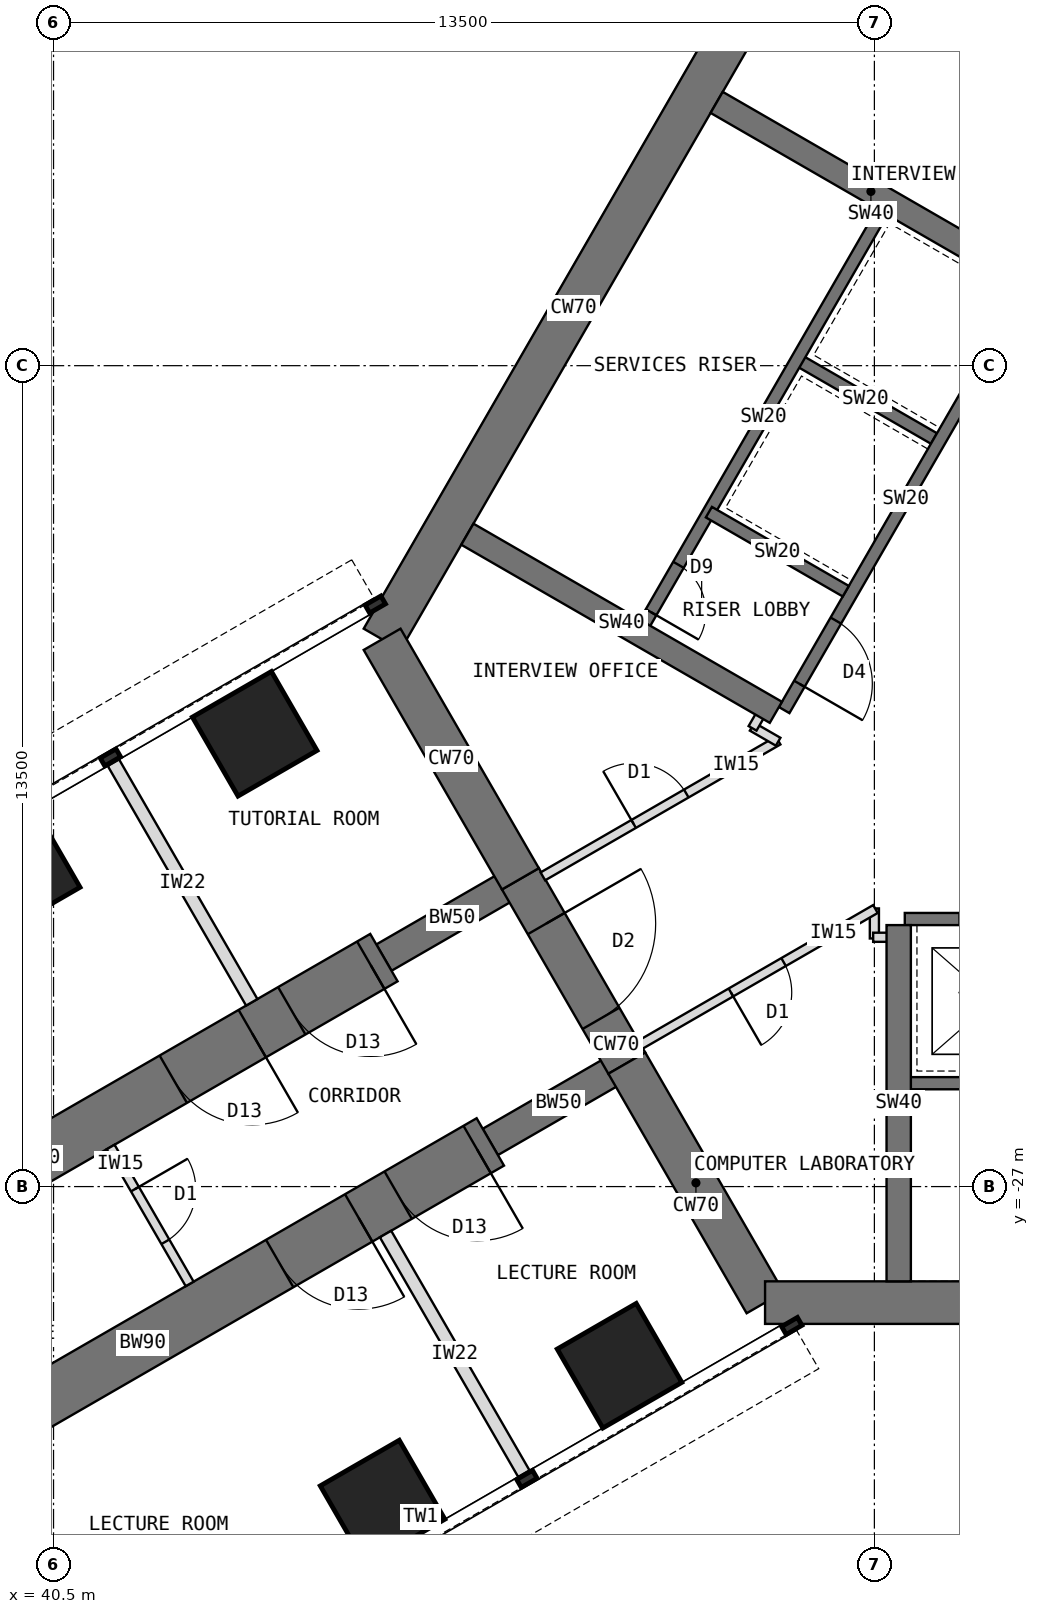
"""IFC4 building model, lengths in metres.
Left out: names, types, materials, properties, quantities, classifications, styles, units other than length and angle.
Written with IfcOpenShell. Run it as: python <this file> out.ifc"""

import sys

from ifc_helpers import new_model, si_unit, direction, frame, frame_2d, origin, origin_2d, place, context, subcontext, project, spatial, rectangle, extrude, element, fill, save


model = new_model("IFC4")
c1 = context("Model", 3, precision=1e-05, world=origin(), true_north=direction((0.0, 1.0)))
c2 = subcontext(c1, "Body", "Model", "MODEL_VIEW")
j1 = project(units=[si_unit("LENGTHUNIT", "METRE"), si_unit("PLANEANGLEUNIT", "RADIAN")], contexts=[c1])
p1 = place(None, origin())
s1 = spatial("IfcSite", under=j1, at=p1, CompositionType="ELEMENT")
p2 = place(p1, origin())
s2 = spatial("IfcBuilding", under=s1, at=p2, CompositionType="ELEMENT")
p3 = place(p2, frame((0.0, 0.0, 28.5)))
s3 = spatial("IfcBuildingStorey", under=s2, at=p3, CompositionType="ELEMENT", Elevation=28.5)
p4 = place(p3, frame((52.202, -7.092, 0.0), z_axis=(0.0, 0.0, 1.0), x_axis=(-0.500005998175, -0.866021940709, 0.0)))
e1 = element("IfcWall", 1, at=p4, inside=s3, PredefinedType="SHEAR", context=c2, shape_type="SweptSolid", body=[
    extrude(rectangle(XDim=12.596, YDim=0.7, at=frame_2d((6.298, 0.0))), origin(), (0.0, 0.0, 1.0), 4.0),
])
p5 = place(p3, frame((45.904, -18.0, 0.0), z_axis=(0.0, 0.0, 1.0), x_axis=(0.500024481964, -0.866011268655, 0.0)))
e2 = element("IfcWall", 2, at=p5, inside=s3, PredefinedType="SHEAR", context=c2, shape_type="SweptSolid", body=[
    extrude(rectangle(XDim=4.548, YDim=0.7, at=frame_2d((2.274, 0.0))), origin(), (0.0, 0.0, 1.0), 4.0),
])
p6 = place(p3, frame((48.178, -21.939, 0.0), z_axis=(0.0, 0.0, 1.0), x_axis=(0.500010275428, -0.866019471182, 0.0)))
e3 = element("IfcWall", 3, at=p6, inside=s3, PredefinedType="SHEAR", context=c2, shape_type="SweptSolid", body=[
    extrude(rectangle(XDim=3.5, YDim=0.7, at=frame_2d((1.75, 0.0))), origin(), (0.0, 0.0, 1.0), 4.0),
])
p7 = place(p6, frame((0.85, 0.0, 0.0)))
e4 = element("IfcOpeningElement", 4, at=p7, cuts=e3, PredefinedType="OPENING", context=c2, shape_type="SweptSolid", body=[
    extrude(rectangle(XDim=1.8, YDim=2.1, at=frame_2d((0.9, 1.05))), frame((0.0, 0.36, 0.0), z_axis=(0.0, -1.0, 0.0), x_axis=(1.0, 0.0, 0.0)), (0.0, 0.0, 1.0), 0.72),
])
p8 = place(p3, frame((49.928, -24.97, 0.0), z_axis=(0.0, 0.0, 1.0), x_axis=(0.499984222037, -0.866034513004, 0.0)))
e5 = element("IfcWall", 5, at=p8, inside=s3, PredefinedType="SHEAR", context=c2, shape_type="SweptSolid", body=[
    extrude(rectangle(XDim=4.548, YDim=0.7, at=frame_2d((2.274, 0.0))), origin(), (0.0, 0.0, 1.0), 4.0),
])
p9 = place(p3, frame((52.202, -28.908, 0.0), z_axis=(0.0, 0.0, 1.0), x_axis=(1.0, 0.0, 0.0)))
e6 = element("IfcWall", 6, at=p9, inside=s3, PredefinedType="SHEAR", context=c2, shape_type="SweptSolid", body=[
    extrude(rectangle(XDim=12.596, YDim=0.7, at=frame_2d((6.298, 0.0))), origin(), (0.0, 0.0, 1.0), 4.0),
])
p10 = place(p3, frame((49.928, -24.97, 0.0), z_axis=(0.0, 0.0, 1.0), x_axis=(-0.866031863473, -0.499988811324, 0.0)))
e7 = element("IfcWall", 7, at=p10, inside=s3, PredefinedType="SHEAR", context=c2, shape_type="SweptSolid", body=[
    extrude(rectangle(XDim=2.592, YDim=0.5, at=frame_2d((1.296, 0.0))), origin(), (0.0, 0.0, 1.0), 4.0),
])
p11 = place(p3, frame((47.684, -26.266, 0.0), z_axis=(0.0, 0.0, 1.0), x_axis=(-0.866027579429, -0.499996231654, 0.0)))
e8 = element("IfcWall", 8, at=p11, inside=s3, PredefinedType="SHEAR", context=c2, shape_type="SweptSolid", body=[
    extrude(rectangle(XDim=13.2, YDim=0.9, at=frame_2d((6.6, 0.0))), origin(), (0.0, 0.0, 1.0), 4.0),
])
p12 = place(p11, frame((0.25, 0.0, 0.0)))
e9 = element("IfcOpeningElement", 9, at=p12, cuts=e8, PredefinedType="OPENING", context=c2, shape_type="SweptSolid", body=[
    extrude(rectangle(XDim=1.5, YDim=2.1, at=frame_2d((0.75, 1.05))), frame((0.0, 0.46, 0.0), z_axis=(0.0, -1.0, 0.0), x_axis=(1.0, 0.0, 0.0)), (0.0, 0.0, 1.0), 0.92),
])
p13 = place(p11, frame((2.5, 0.0, 0.0)))
e10 = element("IfcOpeningElement", 10, at=p13, cuts=e8, PredefinedType="OPENING", context=c2, shape_type="SweptSolid", body=[
    extrude(rectangle(XDim=1.5, YDim=2.1, at=frame_2d((0.75, 1.05))), frame((0.0, 0.46, 0.0), z_axis=(0.0, -1.0, 0.0), x_axis=(1.0, 0.0, 0.0)), (0.0, 0.0, 1.0), 0.92),
])
p14 = place(p3, frame((48.178, -21.939, 0.0), z_axis=(0.0, 0.0, 1.0), x_axis=(-0.866072649678, -0.499918158782, 0.0)))
e11 = element("IfcWall", 11, at=p14, inside=s3, PredefinedType="SHEAR", context=c2, shape_type="SweptSolid", body=[
    extrude(rectangle(XDim=2.592, YDim=0.5, at=frame_2d((1.296, 0.0))), origin(), (0.0, 0.0, 1.0), 4.0),
])
p15 = place(p3, frame((45.934, -23.234, 0.0), z_axis=(0.0, 0.0, 1.0), x_axis=(-0.866019570528, -0.500010103361, 0.0)))
e12 = element("IfcWall", 12, at=p15, inside=s3, PredefinedType="SHEAR", context=c2, shape_type="SweptSolid", body=[
    extrude(rectangle(XDim=13.2, YDim=0.9, at=frame_2d((6.6, 0.0))), origin(), (0.0, 0.0, 1.0), 4.0),
])
p16 = place(p15, frame((0.25, 0.0, 0.0)))
e13 = element("IfcOpeningElement", 13, at=p16, cuts=e12, PredefinedType="OPENING", context=c2, shape_type="SweptSolid", body=[
    extrude(rectangle(XDim=1.5, YDim=2.1, at=frame_2d((0.75, 1.05))), frame((0.0, 0.46, 0.0), z_axis=(0.0, -1.0, 0.0), x_axis=(1.0, 0.0, 0.0)), (0.0, 0.0, 1.0), 0.92),
])
p17 = place(p15, frame((2.5, 0.0, 0.0)))
e14 = element("IfcOpeningElement", 14, at=p17, cuts=e12, PredefinedType="OPENING", context=c2, shape_type="SweptSolid", body=[
    extrude(rectangle(XDim=1.5, YDim=2.1, at=frame_2d((0.75, 1.05))), frame((0.0, 0.46, 0.0), z_axis=(0.0, -1.0, 0.0), x_axis=(1.0, 0.0, 0.0)), (0.0, 0.0, 1.0), 0.92),
])
for number, where, z_axis, x_axis in (
    (15, (49.809, -29.946, 0.0), (0.0, 0.0, 1.0), (0.866, 0.5, 0.0)),
    (16, (43.809, -19.554, 0.0), (0.0, 0.0, 1.0), (0.866, 0.5, 0.0)),
    (17, (45.912, -32.196, 0.0), (0.0, 0.0, 1.0), (0.866, 0.5, 0.0)),
    (18, (39.912, -21.804, 0.0), (0.0, 0.0, 1.0), (0.866, 0.5, 0.0)),
):
    element("IfcColumn", number, at=place(p3, frame(where, z_axis=z_axis, x_axis=x_axis)), inside=s3, PredefinedType="COLUMN", context=c2, shape_type="SweptSolid", body=[
        extrude(rectangle(XDim=1.5, YDim=1.5, at=origin_2d()), origin(), (0.0, 0.0, 1.0), 4.0),
    ])
p18 = place(p3, frame((56.516, -12.236, 0.0), z_axis=(0.0, 0.0, 1.0), x_axis=(-0.49999894854, -0.866026010844, 0.0)))
e19 = element("IfcWall", 19, at=p18, inside=s3, PredefinedType="SHEAR", context=c2, shape_type="SweptSolid", body=[
    extrude(rectangle(XDim=8.0, YDim=0.2, at=frame_2d((4.0, 0.0))), origin(), (0.0, 0.0, 1.0), 4.0),
])
p19 = place(p18, frame((6.3, 0.0, 0.0)))
e20 = element("IfcOpeningElement", 20, at=p19, cuts=e19, PredefinedType="OPENING", context=c2, shape_type="SweptSolid", body=[
    extrude(rectangle(XDim=1.2, YDim=2.1, at=frame_2d((0.6, 1.05))), frame((0.0, 0.11, 0.0), z_axis=(0.0, -1.0, 0.0), x_axis=(1.0, 0.0, 0.0)), (0.0, 0.0, 1.0), 0.22),
])
for number, where, z_axis, x_axis in (
    (21, (54.98, -14.697, 0.0), (0.0, 0.0, 1.0), (-0.866, 0.5, 0.0)),
    (22, (53.53, -17.209, 0.0), (0.0, 0.0, 1.0), (-0.866, 0.5, 0.0)),
):
    element("IfcWall", number, at=place(p3, frame(where, z_axis=z_axis, x_axis=x_axis)), inside=s3, PredefinedType="SHEAR", context=c2, shape_type="SweptSolid", body=[
        extrude(rectangle(XDim=2.6, YDim=0.2, at=frame_2d((1.3, 0.0))), origin(), (0.0, 0.0, 1.0), 4.0),
    ])
p20 = place(p3, frame((54.178, -10.886, 0.0), z_axis=(0.0, 0.0, 1.0), x_axis=(-0.49999894854, -0.866026010844, 0.0)))
e23 = element("IfcWall", 23, at=p20, inside=s3, PredefinedType="SHEAR", context=c2, shape_type="SweptSolid", body=[
    extrude(rectangle(XDim=8.0, YDim=0.2, at=frame_2d((4.0, 0.0))), origin(), (0.0, 0.0, 1.0), 4.0),
])
p21 = place(p20, frame((6.8, 0.0, 0.0)))
e24 = element("IfcOpeningElement", 24, at=p21, cuts=e23, PredefinedType="OPENING", context=c2, shape_type="SweptSolid", body=[
    extrude(rectangle(XDim=0.9, YDim=2.1, at=frame_2d((0.45, 1.05))), frame((0.0, 0.11, 0.0), z_axis=(0.0, -1.0, 0.0), x_axis=(1.0, 0.0, 0.0)), (0.0, 0.0, 1.0), 0.22),
])
for number, where, z_axis, x_axis in (
    (25, (52.38, -19.201, 0.0), (0.0, 0.0, 1.0), (-0.866, 0.5, 0.0)),
    (26, (56.48, -12.099, 0.0), (0.0, 0.0, 1.0), (-0.866, 0.5, 0.0)),
):
    element("IfcWall", number, at=place(p3, frame(where, z_axis=z_axis, x_axis=x_axis)), inside=s3, PredefinedType="SHEAR", context=c2, shape_type="SweptSolid", body=[
        extrude(rectangle(XDim=5.858, YDim=0.4, at=frame_2d((2.929, 0.0))), origin(), (0.0, 0.0, 1.0), 4.0),
    ])
p22 = place(p3, frame((54.5, -22.6, 0.0), z_axis=(0.0, 0.0, 1.0), x_axis=(1.0, 0.0, 0.0)))
e27 = element("IfcWall", 27, at=p22, inside=s3, PredefinedType="SHEAR", context=c2, shape_type="SweptSolid", body=[
    extrude(rectangle(XDim=8.0, YDim=0.2, at=frame_2d((4.0, 0.0))), origin(), (0.0, 0.0, 1.0), 4.0),
])
p23 = place(p22, frame((6.3, 0.0, 0.0)))
e28 = element("IfcOpeningElement", 28, at=p23, cuts=e27, PredefinedType="OPENING", context=c2, shape_type="SweptSolid", body=[
    extrude(rectangle(XDim=1.2, YDim=2.1, at=frame_2d((0.6, 1.05))), frame((0.0, 0.11, 0.0), z_axis=(0.0, -1.0, 0.0), x_axis=(1.0, 0.0, 0.0)), (0.0, 0.0, 1.0), 0.22),
])
p24 = place(p22, frame((0.9, 0.0, 0.0)))
e29 = element("IfcOpeningElement", 29, at=p24, cuts=e27, PredefinedType="OPENING", context=c2, shape_type="SweptSolid", body=[
    extrude(rectangle(XDim=1.1, YDim=2.2, at=frame_2d((0.55, 1.1))), frame((0.0, 0.11, 0.0), z_axis=(0.0, -1.0, 0.0), x_axis=(1.0, 0.0, 0.0)), (0.0, 0.0, 1.0), 0.22),
])
p25 = place(p3, frame((54.5, -25.3, 0.0), z_axis=(0.0, 0.0, 1.0), x_axis=(1.0, 0.0, 0.0)))
e30 = element("IfcWall", 30, at=p25, inside=s3, PredefinedType="SHEAR", context=c2, shape_type="SweptSolid", body=[
    extrude(rectangle(XDim=8.0, YDim=0.2, at=frame_2d((4.0, 0.0))), origin(), (0.0, 0.0, 1.0), 4.0),
])
p26 = place(p25, frame((6.7, 0.0, 0.0)))
e31 = element("IfcOpeningElement", 31, at=p26, cuts=e30, PredefinedType="OPENING", context=c2, shape_type="SweptSolid", body=[
    extrude(rectangle(XDim=1.1, YDim=2.1, at=frame_2d((0.55, 1.05))), frame((0.0, 0.11, 0.0), z_axis=(0.0, -1.0, 0.0), x_axis=(1.0, 0.0, 0.0)), (0.0, 0.0, 1.0), 0.22),
])
p27 = place(p3, frame((54.4, -22.7, 0.0), z_axis=(0.0, 0.0, 1.0), x_axis=(0.0, -1.0, 0.0)))
e32 = element("IfcWall", 32, at=p27, inside=s3, PredefinedType="SHEAR", context=c2, shape_type="SweptSolid", body=[
    extrude(rectangle(XDim=5.858, YDim=0.4, at=frame_2d((2.929, 0.0))), origin(), (0.0, 0.0, 1.0), 4.0),
])
for number, where, z_axis, x_axis in (
    (33, (45.96, -27.78, 0.0), (0.0, 0.0, 1.0), (0.5, -0.866, 0.0)),
    (34, (43.76, -23.97, 0.0), (0.0, 0.0, 1.0), (-0.5, 0.866, 0.0)),
):
    element("IfcWall", number, at=place(p3, frame(where, z_axis=z_axis, x_axis=x_axis)), inside=s3, PredefinedType="PARTITIONING", context=c2, shape_type="SweptSolid", body=[
        extrude(rectangle(XDim=4.55, YDim=0.215, at=frame_2d((2.275, 0.0))), origin(), (0.0, 0.0, 1.0), 3.8),
    ])
p28 = place(p3, frame((54.0, -22.92, 0.0), z_axis=(0.0, 0.0, 1.0), x_axis=(0.0, 1.0, 0.0)))
e35 = element("IfcWall", 35, at=p28, inside=s3, PredefinedType="PARTITIONING", context=c2, shape_type="SweptSolid", body=[
    extrude(rectangle(XDim=0.494, YDim=0.15, at=frame_2d((0.247, 0.0))), origin(), (0.0, 0.0, 1.0), 3.8),
])
p29 = place(p3, frame((54.017, -22.436, 0.0), z_axis=(0.0, 0.0, 1.0), x_axis=(-0.866015446554, -0.500017246033, 0.0)))
e36 = element("IfcWall", 36, at=p29, inside=s3, PredefinedType="PARTITIONING", context=c2, shape_type="SweptSolid", body=[
    extrude(rectangle(XDim=4.469, YDim=0.15, at=frame_2d((2.234, 0.0))), origin(), (0.0, 0.0, 1.0), 3.8),
])
p30 = place(p29, frame((1.744, 0.0, 0.0)))
e37 = element("IfcOpeningElement", 37, at=p30, cuts=e36, PredefinedType="OPENING", context=c2, shape_type="SweptSolid", body=[
    extrude(rectangle(XDim=1.0, YDim=2.1, at=frame_2d((0.5, 1.05))), frame((0.0, 0.085, 0.0), z_axis=(0.0, -1.0, 0.0), x_axis=(1.0, 0.0, 0.0)), (0.0, 0.0, 1.0), 0.17),
])
p31 = place(p3, frame((48.548, -21.898, 0.0), z_axis=(0.0, 0.0, 1.0), x_axis=(0.866025445582, 0.499999927604, 0.0)))
e38 = element("IfcWall", 38, at=p31, inside=s3, PredefinedType="PARTITIONING", context=c2, shape_type="SweptSolid", body=[
    extrude(rectangle(XDim=4.468, YDim=0.15, at=frame_2d((2.234, 0.0))), origin(), (0.0, 0.0, 1.0), 3.8),
])
p32 = place(p31, frame((1.724, 0.0, 0.0)))
e39 = element("IfcOpeningElement", 39, at=p32, cuts=e38, PredefinedType="OPENING", context=c2, shape_type="SweptSolid", body=[
    extrude(rectangle(XDim=1.0, YDim=2.1, at=frame_2d((0.5, 1.05))), frame((0.0, 0.085, 0.0), z_axis=(0.0, -1.0, 0.0), x_axis=(1.0, 0.0, 0.0)), (0.0, 0.0, 1.0), 0.17),
])
p33 = place(p3, frame((52.417, -19.684, 0.0), z_axis=(0.0, 0.0, 1.0), x_axis=(-0.865831790172, 0.50033519877, 0.0)))
e40 = element("IfcWall", 40, at=p33, inside=s3, PredefinedType="PARTITIONING", context=c2, shape_type="SweptSolid", body=[
    extrude(rectangle(XDim=0.494, YDim=0.15, at=frame_2d((0.247, 0.0))), origin(), (0.0, 0.0, 1.0), 3.8),
])
for number, where, z_axis, x_axis in (
    (41, (51.997, -19.464, 0.0), (0.0, 0.0, 1.0), (0.5, 0.866, 0.0)),
    (42, (54.41, -22.9, 0.0), (0.0, 0.0, 1.0), (-1.0, 0.0, 0.0)),
):
    element("IfcWall", number, at=place(p3, frame(where, z_axis=z_axis, x_axis=x_axis)), inside=s3, PredefinedType="PARTITIONING", context=c2, shape_type="SweptSolid", body=[
        extrude(rectangle(XDim=0.43, YDim=0.15, at=frame_2d((0.215, 0.0))), origin(), (0.0, 0.0, 1.0), 3.8),
    ])
p34 = place(p3, frame((41.439, -26.349, 0.0), z_axis=(0.0, 0.0, 1.0), x_axis=(0.500006934395, -0.866021400173, 0.0)))
e43 = element("IfcWall", 43, at=p34, inside=s3, PredefinedType="PARTITIONING", context=c2, shape_type="SweptSolid", body=[
    extrude(rectangle(XDim=2.6, YDim=0.15, at=frame_2d((1.3, 0.0))), origin(), (0.0, 0.0, 1.0), 3.8),
])
p35 = place(p34, frame((0.8, 0.0, 0.0)))
e44 = element("IfcOpeningElement", 44, at=p35, cuts=e43, PredefinedType="OPENING", context=c2, shape_type="SweptSolid", body=[
    extrude(rectangle(XDim=1.0, YDim=2.1, at=frame_2d((0.5, 1.05))), frame((0.0, 0.085, 0.0), z_axis=(0.0, -1.0, 0.0), x_axis=(1.0, 0.0, 0.0)), (0.0, 0.0, 1.0), 0.17),
])
p36 = place(p19, origin())
e45 = element("IfcDoor", 45, at=p36, inside=s3, OperationType="SINGLE_SWING_RIGHT", PredefinedType="DOOR", context=c2, shape_type="SweptSolid", body=[
    extrude(rectangle(XDim=1.2, YDim=2.1, at=frame_2d((0.6, 1.05))), frame((0.0, 0.025, 0.0), z_axis=(0.0, -1.0, 0.0), x_axis=(1.0, 0.0, 0.0)), (0.0, 0.0, 1.0), 0.05),
])
fill(e20, e45)
p37 = place(p21, origin())
e46 = element("IfcDoor", 46, at=p37, inside=s3, OperationType="SINGLE_SWING_RIGHT", PredefinedType="DOOR", context=c2, shape_type="SweptSolid", body=[
    extrude(rectangle(XDim=0.9, YDim=2.1, at=frame_2d((0.45, 1.05))), frame((0.0, 0.025, 0.0), z_axis=(0.0, -1.0, 0.0), x_axis=(1.0, 0.0, 0.0)), (0.0, 0.0, 1.0), 0.05),
])
fill(e24, e46)
p38 = place(p7, origin())
e47 = element("IfcDoor", 47, at=p38, inside=s3, OperationType="DOUBLE_DOOR_DOUBLE_SWING", PredefinedType="DOOR", context=c2, shape_type="SweptSolid", body=[
    extrude(rectangle(XDim=1.72, YDim=2.06, at=frame_2d((0.9, 1.03))), frame((0.0, 0.025, 0.0), z_axis=(0.0, -1.0, 0.0), x_axis=(1.0, 0.0, 0.0)), (0.0, 0.0, 1.0), 0.05),
    extrude(rectangle(XDim=0.04, YDim=2.1, at=frame_2d((0.02, 1.05))), frame((0.0, 0.35, 0.0), z_axis=(0.0, -1.0, 0.0), x_axis=(1.0, 0.0, 0.0)), (0.0, 0.0, 1.0), 0.699),
    extrude(rectangle(XDim=0.04, YDim=2.1, at=frame_2d((1.78, 1.05))), frame((0.0, 0.35, 0.0), z_axis=(0.0, -1.0, 0.0), x_axis=(1.0, 0.0, 0.0)), (0.0, 0.0, 1.0), 0.699),
    extrude(rectangle(XDim=1.72, YDim=0.04, at=frame_2d((0.9, 2.08))), frame((0.0, 0.35, 0.0), z_axis=(0.0, -1.0, 0.0), x_axis=(1.0, 0.0, 0.0)), (0.0, 0.0, 1.0), 0.699),
])
fill(e4, e47)
p39 = place(p32, origin())
e48 = element("IfcDoor", 48, at=p39, inside=s3, OperationType="SINGLE_SWING_LEFT", PredefinedType="DOOR", context=c2, shape_type="SweptSolid", body=[
    extrude(rectangle(XDim=1.0, YDim=2.1, at=frame_2d((0.5, 1.05))), frame((0.0, 0.025, 0.0), z_axis=(0.0, -1.0, 0.0), x_axis=(1.0, 0.0, 0.0)), (0.0, 0.0, 1.0), 0.05),
])
fill(e39, e48)
p40 = place(p30, origin())
e49 = element("IfcDoor", 49, at=p40, inside=s3, OperationType="SINGLE_SWING_RIGHT", PredefinedType="DOOR", context=c2, shape_type="SweptSolid", body=[
    extrude(rectangle(XDim=1.0, YDim=2.1, at=frame_2d((0.5, 1.05))), frame((0.0, 0.025, 0.0), z_axis=(0.0, -1.0, 0.0), x_axis=(1.0, 0.0, 0.0)), (0.0, 0.0, 1.0), 0.05),
])
fill(e37, e49)
p41 = place(p35, origin())
e50 = element("IfcDoor", 50, at=p41, inside=s3, OperationType="SINGLE_SWING_LEFT", PredefinedType="DOOR", context=c2, shape_type="SweptSolid", body=[
    extrude(rectangle(XDim=1.0, YDim=2.1, at=frame_2d((0.5, 1.05))), frame((0.0, 0.025, 0.0), z_axis=(0.0, -1.0, 0.0), x_axis=(1.0, 0.0, 0.0)), (0.0, 0.0, 1.0), 0.05),
])
fill(e44, e50)
p42 = place(p12, origin())
e51 = element("IfcDoor", 51, at=p42, inside=s3, OperationType="DOUBLE_DOOR_SINGLE_SWING", PredefinedType="DOOR", context=c2, shape_type="SweptSolid", body=[
    extrude(rectangle(XDim=1.42, YDim=2.06, at=frame_2d((0.75, 1.03))), frame((0.0, 0.025, 0.0), z_axis=(0.0, -1.0, 0.0), x_axis=(1.0, 0.0, 0.0)), (0.0, 0.0, 1.0), 0.05),
    extrude(rectangle(XDim=0.04, YDim=2.1, at=frame_2d((0.02, 1.05))), frame((0.0, 0.45, 0.0), z_axis=(0.0, -1.0, 0.0), x_axis=(1.0, 0.0, 0.0)), (0.0, 0.0, 1.0), 0.899),
    extrude(rectangle(XDim=0.04, YDim=2.1, at=frame_2d((1.48, 1.05))), frame((0.0, 0.45, 0.0), z_axis=(0.0, -1.0, 0.0), x_axis=(1.0, 0.0, 0.0)), (0.0, 0.0, 1.0), 0.899),
    extrude(rectangle(XDim=1.42, YDim=0.04, at=frame_2d((0.75, 2.08))), frame((0.0, 0.45, 0.0), z_axis=(0.0, -1.0, 0.0), x_axis=(1.0, 0.0, 0.0)), (0.0, 0.0, 1.0), 0.899),
])
fill(e9, e51)
p43 = place(p13, origin())
e52 = element("IfcDoor", 52, at=p43, inside=s3, OperationType="DOUBLE_DOOR_SINGLE_SWING", PredefinedType="DOOR", context=c2, shape_type="SweptSolid", body=[
    extrude(rectangle(XDim=1.42, YDim=2.06, at=frame_2d((0.75, 1.03))), frame((0.0, 0.025, 0.0), z_axis=(0.0, -1.0, 0.0), x_axis=(1.0, 0.0, 0.0)), (0.0, 0.0, 1.0), 0.05),
    extrude(rectangle(XDim=0.04, YDim=2.1, at=frame_2d((0.02, 1.05))), frame((0.0, 0.45, 0.0), z_axis=(0.0, -1.0, 0.0), x_axis=(1.0, 0.0, 0.0)), (0.0, 0.0, 1.0), 0.899),
    extrude(rectangle(XDim=0.04, YDim=2.1, at=frame_2d((1.48, 1.05))), frame((0.0, 0.45, 0.0), z_axis=(0.0, -1.0, 0.0), x_axis=(1.0, 0.0, 0.0)), (0.0, 0.0, 1.0), 0.899),
    extrude(rectangle(XDim=1.42, YDim=0.04, at=frame_2d((0.75, 2.08))), frame((0.0, 0.45, 0.0), z_axis=(0.0, -1.0, 0.0), x_axis=(1.0, 0.0, 0.0)), (0.0, 0.0, 1.0), 0.899),
])
fill(e10, e52)
p44 = place(p16, origin())
e53 = element("IfcDoor", 53, at=p44, inside=s3, OperationType="DOUBLE_DOOR_SINGLE_SWING", PredefinedType="DOOR", context=c2, shape_type="SweptSolid", body=[
    extrude(rectangle(XDim=1.42, YDim=2.06, at=frame_2d((0.75, 1.03))), frame((0.0, 0.025, 0.0), z_axis=(0.0, -1.0, 0.0), x_axis=(1.0, 0.0, 0.0)), (0.0, 0.0, 1.0), 0.05),
    extrude(rectangle(XDim=0.04, YDim=2.1, at=frame_2d((0.02, 1.05))), frame((0.0, 0.45, 0.0), z_axis=(0.0, -1.0, 0.0), x_axis=(1.0, 0.0, 0.0)), (0.0, 0.0, 1.0), 0.899),
    extrude(rectangle(XDim=0.04, YDim=2.1, at=frame_2d((1.48, 1.05))), frame((0.0, 0.45, 0.0), z_axis=(0.0, -1.0, 0.0), x_axis=(1.0, 0.0, 0.0)), (0.0, 0.0, 1.0), 0.899),
    extrude(rectangle(XDim=1.42, YDim=0.04, at=frame_2d((0.75, 2.08))), frame((0.0, 0.45, 0.0), z_axis=(0.0, -1.0, 0.0), x_axis=(1.0, 0.0, 0.0)), (0.0, 0.0, 1.0), 0.899),
])
fill(e13, e53)
p45 = place(p17, origin())
e54 = element("IfcDoor", 54, at=p45, inside=s3, OperationType="DOUBLE_DOOR_SINGLE_SWING", PredefinedType="DOOR", context=c2, shape_type="SweptSolid", body=[
    extrude(rectangle(XDim=1.42, YDim=2.06, at=frame_2d((0.75, 1.03))), frame((0.0, 0.025, 0.0), z_axis=(0.0, -1.0, 0.0), x_axis=(1.0, 0.0, 0.0)), (0.0, 0.0, 1.0), 0.05),
    extrude(rectangle(XDim=0.04, YDim=2.1, at=frame_2d((0.02, 1.05))), frame((0.0, 0.45, 0.0), z_axis=(0.0, -1.0, 0.0), x_axis=(1.0, 0.0, 0.0)), (0.0, 0.0, 1.0), 0.899),
    extrude(rectangle(XDim=0.04, YDim=2.1, at=frame_2d((1.48, 1.05))), frame((0.0, 0.45, 0.0), z_axis=(0.0, -1.0, 0.0), x_axis=(1.0, 0.0, 0.0)), (0.0, 0.0, 1.0), 0.899),
    extrude(rectangle(XDim=1.42, YDim=0.04, at=frame_2d((0.75, 2.08))), frame((0.0, 0.45, 0.0), z_axis=(0.0, -1.0, 0.0), x_axis=(1.0, 0.0, 0.0)), (0.0, 0.0, 1.0), 0.899),
])
fill(e14, e54)
save(model, sys.argv[1])
